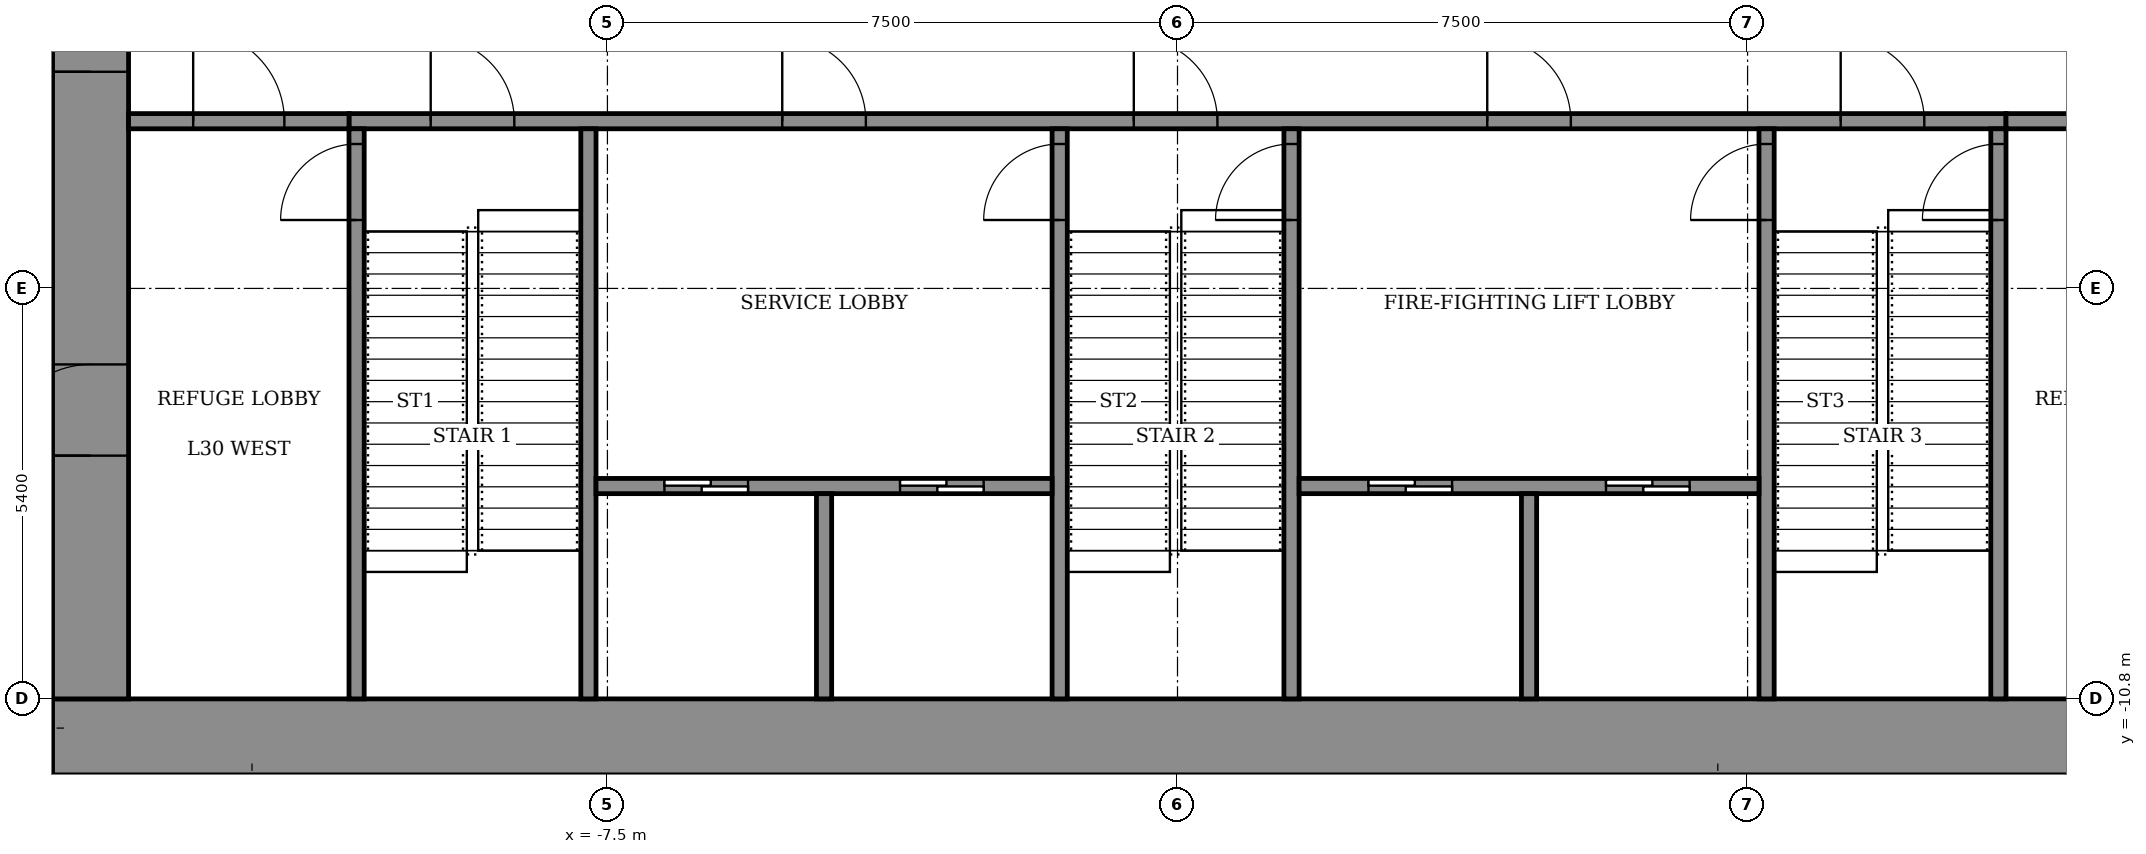
"""IFC4 building model, lengths in metres.
Left out: names, types, materials, properties, quantities, classifications, styles, units other than length and angle.
Written with IfcOpenShell. Run it as: python <this file> out.ifc"""

import sys

from ifc_helpers import new_model, si_unit, direction, frame, frame_2d, origin, place, context, subcontext, project, spatial, rectangle, extrude, element, fill, save


model = new_model("IFC4")
c1 = context("Model", 3, precision=1e-05, world=origin(), true_north=direction((0.0, 1.0)))
c2 = subcontext(c1, "Body", "Model", "MODEL_VIEW")
j1 = project(units=[si_unit("LENGTHUNIT", "METRE"), si_unit("PLANEANGLEUNIT", "RADIAN")], contexts=[c1])
p1 = place(None, origin())
s1 = spatial("IfcSite", under=j1, at=p1, CompositionType="ELEMENT")
p2 = place(p1, origin())
s2 = spatial("IfcBuilding", under=s1, at=p2, CompositionType="ELEMENT")
p3 = place(p2, frame((0.0, 0.0, 119.9)))
s3 = spatial("IfcBuildingStorey", under=s2, at=p3, CompositionType="ELEMENT", Elevation=119.9)
p4 = place(p3, frame((-14.8, -11.3, 0.0), z_axis=(0.0, 0.0, 1.0), x_axis=(1.0, 0.0, 0.0)))
e1 = element("IfcWall", 1, at=p4, inside=s3, PredefinedType="SHEAR", context=c2, shape_type="SweptSolid", body=[
    extrude(rectangle(XDim=29.6, YDim=1.0, at=frame_2d((14.8, 0.0))), origin(), (0.0, 0.0, 1.0), 5.6),
])
p5 = place(p3, frame((-14.3, -10.8, 0.0), z_axis=(0.0, 0.0, 1.0), x_axis=(0.0, 1.0, 0.0)))
e2 = element("IfcWall", 2, at=p5, inside=s3, PredefinedType="SHEAR", context=c2, shape_type="SweptSolid", body=[
    extrude(rectangle(XDim=21.6, YDim=1.0, at=frame_2d((10.8, 0.0))), origin(), (0.0, 0.0, 1.0), 5.6),
])
p6 = place(p5, frame((8.25, 0.0, 0.0)))
e3 = element("IfcOpeningElement", 3, at=p6, cuts=e2, PredefinedType="OPENING", context=c2, shape_type="SweptSolid", body=[
    extrude(rectangle(XDim=1.2, YDim=2.1, at=frame_2d((0.6, 1.05))), frame((0.0, 0.51, 0.0), z_axis=(0.0, -1.0, 0.0), x_axis=(1.0, 0.0, 0.0)), (0.0, 0.0, 1.0), 1.02),
])
p7 = place(p5, frame((15.25, 0.0, 0.0)))
e4 = element("IfcOpeningElement", 4, at=p7, cuts=e2, PredefinedType="OPENING", context=c2, shape_type="SweptSolid", body=[
    extrude(rectangle(XDim=1.2, YDim=2.1, at=frame_2d((0.6, 1.05))), frame((0.0, 0.51, 0.0), z_axis=(0.0, -1.0, 0.0), x_axis=(1.0, 0.0, 0.0)), (0.0, 0.0, 1.0), 1.02),
])
p8 = place(p5, frame((3.2, 0.0, 0.0)))
e5 = element("IfcOpeningElement", 5, at=p8, cuts=e2, PredefinedType="OPENING", context=c2, shape_type="SweptSolid", body=[
    extrude(rectangle(XDim=1.2, YDim=2.1, at=frame_2d((0.6, 1.05))), frame((0.0, 0.51, 0.0), z_axis=(0.0, -1.0, 0.0), x_axis=(1.0, 0.0, 0.0)), (0.0, 0.0, 1.0), 1.02),
])
p9 = place(p3, frame((-10.9, -3.2, 0.0), z_axis=(0.0, 0.0, 1.0), x_axis=(1.0, 0.0, 0.0)))
e6 = element("IfcWall", 6, at=p9, inside=s3, PredefinedType="SHEAR", context=c2, shape_type="SweptSolid", body=[
    extrude(rectangle(XDim=21.8, YDim=0.2, at=frame_2d((10.9, 0.0))), origin(), (0.0, 0.0, 1.0), 5.05),
])
p10 = place(p9, frame((1.075, 0.0, 0.0)))
e7 = element("IfcOpeningElement", 7, at=p10, cuts=e6, PredefinedType="OPENING", context=c2, shape_type="SweptSolid", body=[
    extrude(rectangle(XDim=1.1, YDim=2.1, at=frame_2d((0.55, 1.05))), frame((0.0, 0.11, 0.0), z_axis=(0.0, -1.0, 0.0), x_axis=(1.0, 0.0, 0.0)), (0.0, 0.0, 1.0), 0.22),
])
p11 = place(p9, frame((10.325, 0.0, 0.0)))
e8 = element("IfcOpeningElement", 8, at=p11, cuts=e6, PredefinedType="OPENING", context=c2, shape_type="SweptSolid", body=[
    extrude(rectangle(XDim=1.1, YDim=2.1, at=frame_2d((0.55, 1.05))), frame((0.0, 0.11, 0.0), z_axis=(0.0, -1.0, 0.0), x_axis=(1.0, 0.0, 0.0)), (0.0, 0.0, 1.0), 0.22),
])
p12 = place(p9, frame((19.625, 0.0, 0.0)))
e9 = element("IfcOpeningElement", 9, at=p12, cuts=e6, PredefinedType="OPENING", context=c2, shape_type="SweptSolid", body=[
    extrude(rectangle(XDim=1.1, YDim=2.1, at=frame_2d((0.55, 1.05))), frame((0.0, 0.11, 0.0), z_axis=(0.0, -1.0, 0.0), x_axis=(1.0, 0.0, 0.0)), (0.0, 0.0, 1.0), 0.22),
])
p13 = place(p9, frame((5.7, 0.0, 0.0)))
e10 = element("IfcOpeningElement", 10, at=p13, cuts=e6, PredefinedType="OPENING", context=c2, shape_type="SweptSolid", body=[
    extrude(rectangle(XDim=1.1, YDim=2.1, at=frame_2d((0.55, 1.05))), frame((0.0, 0.11, 0.0), z_axis=(0.0, -1.0, 0.0), x_axis=(1.0, 0.0, 0.0)), (0.0, 0.0, 1.0), 0.22),
])
p14 = place(p9, frame((14.975, 0.0, 0.0)))
e11 = element("IfcOpeningElement", 11, at=p14, cuts=e6, PredefinedType="OPENING", context=c2, shape_type="SweptSolid", body=[
    extrude(rectangle(XDim=1.1, YDim=2.1, at=frame_2d((0.55, 1.05))), frame((0.0, 0.11, 0.0), z_axis=(0.0, -1.0, 0.0), x_axis=(1.0, 0.0, 0.0)), (0.0, 0.0, 1.0), 0.22),
])
p15 = place(p3, frame((-10.8, -10.8, 0.0), z_axis=(0.0, 0.0, 1.0), x_axis=(0.0, 1.0, 0.0)))
e12 = element("IfcWall", 12, at=p15, inside=s3, PredefinedType="SHEAR", context=c2, shape_type="SweptSolid", body=[
    extrude(rectangle(XDim=7.5, YDim=0.2, at=frame_2d((3.75, 0.0))), origin(), (0.0, 0.0, 1.0), 5.05),
])
p16 = place(p15, frame((6.3, 0.0, 0.0)))
e13 = element("IfcOpeningElement", 13, at=p16, cuts=e12, PredefinedType="OPENING", context=c2, shape_type="SweptSolid", body=[
    extrude(rectangle(XDim=1.0, YDim=2.1, at=frame_2d((0.5, 1.05))), frame((0.0, 0.11, 0.0), z_axis=(0.0, -1.0, 0.0), x_axis=(1.0, 0.0, 0.0)), (0.0, 0.0, 1.0), 0.22),
])
p17 = place(p3, frame((-7.75, -10.8, 0.0), z_axis=(0.0, 0.0, 1.0), x_axis=(0.0, 1.0, 0.0)))
e14 = element("IfcWall", 14, at=p17, inside=s3, PredefinedType="SHEAR", context=c2, shape_type="SweptSolid", body=[
    extrude(rectangle(XDim=7.5, YDim=0.2, at=frame_2d((3.75, 0.0))), origin(), (0.0, 0.0, 1.0), 5.05),
])
p18 = place(p3, frame((-1.55, -10.8, 0.0), z_axis=(0.0, 0.0, 1.0), x_axis=(0.0, 1.0, 0.0)))
e15 = element("IfcWall", 15, at=p18, inside=s3, PredefinedType="SHEAR", context=c2, shape_type="SweptSolid", body=[
    extrude(rectangle(XDim=7.5, YDim=0.2, at=frame_2d((3.75, 0.0))), origin(), (0.0, 0.0, 1.0), 5.05),
])
p19 = place(p18, frame((6.3, 0.0, 0.0)))
e16 = element("IfcOpeningElement", 16, at=p19, cuts=e15, PredefinedType="OPENING", context=c2, shape_type="SweptSolid", body=[
    extrude(rectangle(XDim=1.0, YDim=2.1, at=frame_2d((0.5, 1.05))), frame((0.0, 0.11, 0.0), z_axis=(0.0, -1.0, 0.0), x_axis=(1.0, 0.0, 0.0)), (0.0, 0.0, 1.0), 0.22),
])
p20 = place(p3, frame((1.5, -10.8, 0.0), z_axis=(0.0, 0.0, 1.0), x_axis=(0.0, 1.0, 0.0)))
e17 = element("IfcWall", 17, at=p20, inside=s3, PredefinedType="SHEAR", context=c2, shape_type="SweptSolid", body=[
    extrude(rectangle(XDim=7.5, YDim=0.2, at=frame_2d((3.75, 0.0))), origin(), (0.0, 0.0, 1.0), 5.05),
])
p21 = place(p20, frame((6.3, 0.0, 0.0)))
e18 = element("IfcOpeningElement", 18, at=p21, cuts=e17, PredefinedType="OPENING", context=c2, shape_type="SweptSolid", body=[
    extrude(rectangle(XDim=1.0, YDim=2.1, at=frame_2d((0.5, 1.05))), frame((0.0, 0.11, 0.0), z_axis=(0.0, -1.0, 0.0), x_axis=(1.0, 0.0, 0.0)), (0.0, 0.0, 1.0), 0.22),
])
p22 = place(p3, frame((7.75, -10.8, 0.0), z_axis=(0.0, 0.0, 1.0), x_axis=(0.0, 1.0, 0.0)))
e19 = element("IfcWall", 19, at=p22, inside=s3, PredefinedType="SHEAR", context=c2, shape_type="SweptSolid", body=[
    extrude(rectangle(XDim=7.5, YDim=0.2, at=frame_2d((3.75, 0.0))), origin(), (0.0, 0.0, 1.0), 5.05),
])
p23 = place(p22, frame((6.3, 0.0, 0.0)))
e20 = element("IfcOpeningElement", 20, at=p23, cuts=e19, PredefinedType="OPENING", context=c2, shape_type="SweptSolid", body=[
    extrude(rectangle(XDim=1.0, YDim=2.1, at=frame_2d((0.5, 1.05))), frame((0.0, 0.11, 0.0), z_axis=(0.0, -1.0, 0.0), x_axis=(1.0, 0.0, 0.0)), (0.0, 0.0, 1.0), 0.22),
])
p24 = place(p3, frame((10.8, -10.8, 0.0), z_axis=(0.0, 0.0, 1.0), x_axis=(0.0, 1.0, 0.0)))
e21 = element("IfcWall", 21, at=p24, inside=s3, PredefinedType="SHEAR", context=c2, shape_type="SweptSolid", body=[
    extrude(rectangle(XDim=7.5, YDim=0.2, at=frame_2d((3.75, 0.0))), origin(), (0.0, 0.0, 1.0), 5.05),
])
p25 = place(p24, frame((6.3, 0.0, 0.0)))
e22 = element("IfcOpeningElement", 22, at=p25, cuts=e21, PredefinedType="OPENING", context=c2, shape_type="SweptSolid", body=[
    extrude(rectangle(XDim=1.0, YDim=2.1, at=frame_2d((0.5, 1.05))), frame((0.0, 0.11, 0.0), z_axis=(0.0, -1.0, 0.0), x_axis=(1.0, 0.0, 0.0)), (0.0, 0.0, 1.0), 0.22),
])
p26 = place(p3, frame((-7.65, -8.0, 0.0), z_axis=(0.0, 0.0, 1.0), x_axis=(1.0, 0.0, 0.0)))
e23 = element("IfcWall", 23, at=p26, inside=s3, PredefinedType="SHEAR", context=c2, shape_type="SweptSolid", body=[
    extrude(rectangle(XDim=6.0, YDim=0.2, at=frame_2d((3.0, 0.0))), origin(), (0.0, 0.0, 1.0), 5.05),
])
p27 = place(p26, frame((0.9, 0.0, 0.0)))
e24 = element("IfcOpeningElement", 24, at=p27, cuts=e23, PredefinedType="OPENING", context=c2, shape_type="SweptSolid", body=[
    extrude(rectangle(XDim=1.1, YDim=2.1, at=frame_2d((0.55, 1.05))), frame((0.0, 0.11, 0.0), z_axis=(0.0, -1.0, 0.0), x_axis=(1.0, 0.0, 0.0)), (0.0, 0.0, 1.0), 0.22),
])
p28 = place(p26, frame((4.0, 0.0, 0.0)))
e25 = element("IfcOpeningElement", 25, at=p28, cuts=e23, PredefinedType="OPENING", context=c2, shape_type="SweptSolid", body=[
    extrude(rectangle(XDim=1.1, YDim=2.1, at=frame_2d((0.55, 1.05))), frame((0.0, 0.11, 0.0), z_axis=(0.0, -1.0, 0.0), x_axis=(1.0, 0.0, 0.0)), (0.0, 0.0, 1.0), 0.22),
])
p29 = place(p3, frame((-4.65, -10.8, 0.0), z_axis=(0.0, 0.0, 1.0), x_axis=(0.0, 1.0, 0.0)))
e26 = element("IfcWall", 26, at=p29, inside=s3, PredefinedType="SHEAR", context=c2, shape_type="SweptSolid", body=[
    extrude(rectangle(XDim=2.7, YDim=0.2, at=frame_2d((1.35, 0.0))), origin(), (0.0, 0.0, 1.0), 5.05),
])
p30 = place(p3, frame((1.6, -8.0, 0.0), z_axis=(0.0, 0.0, 1.0), x_axis=(1.0, 0.0, 0.0)))
e27 = element("IfcWall", 27, at=p30, inside=s3, PredefinedType="SHEAR", context=c2, shape_type="SweptSolid", body=[
    extrude(rectangle(XDim=6.05, YDim=0.2, at=frame_2d((3.025, 0.0))), origin(), (0.0, 0.0, 1.0), 5.05),
])
p31 = place(p30, frame((0.913, 0.0, 0.0)))
e28 = element("IfcOpeningElement", 28, at=p31, cuts=e27, PredefinedType="OPENING", context=c2, shape_type="SweptSolid", body=[
    extrude(rectangle(XDim=1.1, YDim=2.1, at=frame_2d((0.55, 1.05))), frame((0.0, 0.11, 0.0), z_axis=(0.0, -1.0, 0.0), x_axis=(1.0, 0.0, 0.0)), (0.0, 0.0, 1.0), 0.22),
])
p32 = place(p30, frame((4.038, 0.0, 0.0)))
e29 = element("IfcOpeningElement", 29, at=p32, cuts=e27, PredefinedType="OPENING", context=c2, shape_type="SweptSolid", body=[
    extrude(rectangle(XDim=1.1, YDim=2.1, at=frame_2d((0.55, 1.05))), frame((0.0, 0.11, 0.0), z_axis=(0.0, -1.0, 0.0), x_axis=(1.0, 0.0, 0.0)), (0.0, 0.0, 1.0), 0.22),
])
p33 = place(p3, frame((4.625, -10.8, 0.0), z_axis=(0.0, 0.0, 1.0), x_axis=(0.0, 1.0, 0.0)))
e30 = element("IfcWall", 30, at=p33, inside=s3, PredefinedType="SHEAR", context=c2, shape_type="SweptSolid", body=[
    extrude(rectangle(XDim=2.7, YDim=0.2, at=frame_2d((1.35, 0.0))), origin(), (0.0, 0.0, 1.0), 5.05),
])
p34 = place(p3, frame((-13.8, -3.2, 0.0), z_axis=(0.0, 0.0, 1.0), x_axis=(1.0, 0.0, 0.0)))
e31 = element("IfcWall", 31, at=p34, inside=s3, PredefinedType="STANDARD", context=c2, shape_type="SweptSolid", body=[
    extrude(rectangle(XDim=2.9, YDim=0.2, at=frame_2d((1.45, 0.0))), origin(), (0.0, 0.0, 1.0), 5.05),
])
p35 = place(p34, frame((0.85, 0.0, 0.0)))
e32 = element("IfcOpeningElement", 32, at=p35, cuts=e31, PredefinedType="OPENING", context=c2, shape_type="SweptSolid", body=[
    extrude(rectangle(XDim=1.2, YDim=2.1, at=frame_2d((0.6, 1.05))), frame((0.0, 0.11, 0.0), z_axis=(0.0, -1.0, 0.0), x_axis=(1.0, 0.0, 0.0)), (0.0, 0.0, 1.0), 0.22),
])
p36 = place(p3, frame((10.9, -3.2, 0.0), z_axis=(0.0, 0.0, 1.0), x_axis=(1.0, 0.0, 0.0)))
e33 = element("IfcWall", 33, at=p36, inside=s3, PredefinedType="STANDARD", context=c2, shape_type="SweptSolid", body=[
    extrude(rectangle(XDim=2.9, YDim=0.2, at=frame_2d((1.45, 0.0))), origin(), (0.0, 0.0, 1.0), 5.05),
])
p37 = place(p36, frame((0.85, 0.0, 0.0)))
e34 = element("IfcOpeningElement", 34, at=p37, cuts=e33, PredefinedType="OPENING", context=c2, shape_type="SweptSolid", body=[
    extrude(rectangle(XDim=1.2, YDim=2.1, at=frame_2d((0.6, 1.05))), frame((0.0, 0.11, 0.0), z_axis=(0.0, -1.0, 0.0), x_axis=(1.0, 0.0, 0.0)), (0.0, 0.0, 1.0), 0.22),
])
p38 = place(p6, origin())
e35 = element("IfcDoor", 35, at=p38, inside=s3, OperationType="DOUBLE_DOOR_SINGLE_SWING", PredefinedType="DOOR", context=c2, shape_type="SweptSolid", body=[
    extrude(rectangle(XDim=1.2, YDim=2.1, at=frame_2d((0.6, 1.05))), frame((0.0, 0.025, 0.0), z_axis=(0.0, -1.0, 0.0), x_axis=(1.0, 0.0, 0.0)), (0.0, 0.0, 1.0), 0.05),
])
fill(e3, e35)
p39 = place(p8, origin())
e36 = element("IfcDoor", 36, at=p39, inside=s3, OperationType="DOUBLE_DOOR_SINGLE_SWING", PredefinedType="DOOR", context=c2, shape_type="SweptSolid", body=[
    extrude(rectangle(XDim=1.2, YDim=2.1, at=frame_2d((0.6, 1.05))), frame((0.0, 0.025, 0.0), z_axis=(0.0, -1.0, 0.0), x_axis=(1.0, 0.0, 0.0)), (0.0, 0.0, 1.0), 0.05),
])
fill(e5, e36)
p40 = place(p31, origin())
e37 = element("IfcDoor", 37, at=p40, inside=s3, OperationType="SLIDING_TO_LEFT", PredefinedType="DOOR", context=c2, shape_type="SweptSolid", body=[
    extrude(rectangle(XDim=1.1, YDim=2.1, at=frame_2d((0.55, 1.05))), frame((0.0, 0.025, 0.0), z_axis=(0.0, -1.0, 0.0), x_axis=(1.0, 0.0, 0.0)), (0.0, 0.0, 1.0), 0.05),
])
fill(e28, e37)
p41 = place(p27, origin())
e38 = element("IfcDoor", 38, at=p41, inside=s3, OperationType="SLIDING_TO_LEFT", PredefinedType="DOOR", context=c2, shape_type="SweptSolid", body=[
    extrude(rectangle(XDim=1.1, YDim=2.1, at=frame_2d((0.55, 1.05))), frame((0.0, 0.025, 0.0), z_axis=(0.0, -1.0, 0.0), x_axis=(1.0, 0.0, 0.0)), (0.0, 0.0, 1.0), 0.05),
])
fill(e24, e38)
p42 = place(p32, origin())
e39 = element("IfcDoor", 39, at=p42, inside=s3, OperationType="SLIDING_TO_LEFT", PredefinedType="DOOR", context=c2, shape_type="SweptSolid", body=[
    extrude(rectangle(XDim=1.1, YDim=2.1, at=frame_2d((0.55, 1.05))), frame((0.0, 0.025, 0.0), z_axis=(0.0, -1.0, 0.0), x_axis=(1.0, 0.0, 0.0)), (0.0, 0.0, 1.0), 0.05),
])
fill(e29, e39)
p43 = place(p28, origin())
e40 = element("IfcDoor", 40, at=p43, inside=s3, OperationType="SLIDING_TO_LEFT", PredefinedType="DOOR", context=c2, shape_type="SweptSolid", body=[
    extrude(rectangle(XDim=1.1, YDim=2.1, at=frame_2d((0.55, 1.05))), frame((0.0, 0.025, 0.0), z_axis=(0.0, -1.0, 0.0), x_axis=(1.0, 0.0, 0.0)), (0.0, 0.0, 1.0), 0.05),
])
fill(e25, e40)
p44 = place(p10, origin())
e41 = element("IfcDoor", 41, at=p44, inside=s3, OperationType="SINGLE_SWING_RIGHT", PredefinedType="DOOR", context=c2, shape_type="SweptSolid", body=[
    extrude(rectangle(XDim=1.1, YDim=2.1, at=frame_2d((0.55, 1.05))), frame((0.0, 0.025, 0.0), z_axis=(0.0, -1.0, 0.0), x_axis=(1.0, 0.0, 0.0)), (0.0, 0.0, 1.0), 0.05),
])
fill(e7, e41)
p45 = place(p11, origin())
e42 = element("IfcDoor", 42, at=p45, inside=s3, OperationType="SINGLE_SWING_RIGHT", PredefinedType="DOOR", context=c2, shape_type="SweptSolid", body=[
    extrude(rectangle(XDim=1.1, YDim=2.1, at=frame_2d((0.55, 1.05))), frame((0.0, 0.025, 0.0), z_axis=(0.0, -1.0, 0.0), x_axis=(1.0, 0.0, 0.0)), (0.0, 0.0, 1.0), 0.05),
])
fill(e8, e42)
p46 = place(p12, origin())
e43 = element("IfcDoor", 43, at=p46, inside=s3, OperationType="SINGLE_SWING_RIGHT", PredefinedType="DOOR", context=c2, shape_type="SweptSolid", body=[
    extrude(rectangle(XDim=1.1, YDim=2.1, at=frame_2d((0.55, 1.05))), frame((0.0, 0.025, 0.0), z_axis=(0.0, -1.0, 0.0), x_axis=(1.0, 0.0, 0.0)), (0.0, 0.0, 1.0), 0.05),
])
fill(e9, e43)
p47 = place(p13, origin())
e44 = element("IfcDoor", 44, at=p47, inside=s3, OperationType="SINGLE_SWING_LEFT", PredefinedType="DOOR", context=c2, shape_type="SweptSolid", body=[
    extrude(rectangle(XDim=1.1, YDim=2.1, at=frame_2d((0.55, 1.05))), frame((0.0, 0.025, 0.0), z_axis=(0.0, -1.0, 0.0), x_axis=(1.0, 0.0, 0.0)), (0.0, 0.0, 1.0), 0.05),
])
fill(e10, e44)
p48 = place(p14, origin())
e45 = element("IfcDoor", 45, at=p48, inside=s3, OperationType="SINGLE_SWING_LEFT", PredefinedType="DOOR", context=c2, shape_type="SweptSolid", body=[
    extrude(rectangle(XDim=1.1, YDim=2.1, at=frame_2d((0.55, 1.05))), frame((0.0, 0.025, 0.0), z_axis=(0.0, -1.0, 0.0), x_axis=(1.0, 0.0, 0.0)), (0.0, 0.0, 1.0), 0.05),
])
fill(e11, e45)
p49 = place(p19, origin())
e46 = element("IfcDoor", 46, at=p49, inside=s3, OperationType="SINGLE_SWING_RIGHT", PredefinedType="DOOR", context=c2, shape_type="SweptSolid", body=[
    extrude(rectangle(XDim=1.0, YDim=2.1, at=frame_2d((0.5, 1.05))), frame((0.0, 0.025, 0.0), z_axis=(0.0, -1.0, 0.0), x_axis=(1.0, 0.0, 0.0)), (0.0, 0.0, 1.0), 0.05),
])
fill(e16, e46)
p50 = place(p21, origin())
e47 = element("IfcDoor", 47, at=p50, inside=s3, OperationType="SINGLE_SWING_RIGHT", PredefinedType="DOOR", context=c2, shape_type="SweptSolid", body=[
    extrude(rectangle(XDim=1.0, YDim=2.1, at=frame_2d((0.5, 1.05))), frame((0.0, 0.025, 0.0), z_axis=(0.0, -1.0, 0.0), x_axis=(1.0, 0.0, 0.0)), (0.0, 0.0, 1.0), 0.05),
])
fill(e18, e47)
p51 = place(p23, origin())
e48 = element("IfcDoor", 48, at=p51, inside=s3, OperationType="SINGLE_SWING_RIGHT", PredefinedType="DOOR", context=c2, shape_type="SweptSolid", body=[
    extrude(rectangle(XDim=1.0, YDim=2.1, at=frame_2d((0.5, 1.05))), frame((0.0, 0.025, 0.0), z_axis=(0.0, -1.0, 0.0), x_axis=(1.0, 0.0, 0.0)), (0.0, 0.0, 1.0), 0.05),
])
fill(e20, e48)
p52 = place(p35, origin())
e49 = element("IfcDoor", 49, at=p52, inside=s3, OperationType="SINGLE_SWING_LEFT", PredefinedType="DOOR", context=c2, shape_type="SweptSolid", body=[
    extrude(rectangle(XDim=1.2, YDim=2.1, at=frame_2d((0.6, 1.05))), frame((0.0, 0.025, 0.0), z_axis=(0.0, -1.0, 0.0), x_axis=(1.0, 0.0, 0.0)), (0.0, 0.0, 1.0), 0.05),
])
fill(e32, e49)
p53 = place(p16, origin())
e50 = element("IfcDoor", 50, at=p53, inside=s3, OperationType="SINGLE_SWING_RIGHT", PredefinedType="DOOR", context=c2, shape_type="SweptSolid", body=[
    extrude(rectangle(XDim=1.0, YDim=2.1, at=frame_2d((0.5, 1.05))), frame((0.0, 0.025, 0.0), z_axis=(0.0, -1.0, 0.0), x_axis=(1.0, 0.0, 0.0)), (0.0, 0.0, 1.0), 0.05),
])
fill(e13, e50)
p54 = place(p25, origin())
e51 = element("IfcDoor", 51, at=p54, inside=s3, OperationType="SINGLE_SWING_RIGHT", PredefinedType="DOOR", context=c2, shape_type="SweptSolid", body=[
    extrude(rectangle(XDim=1.0, YDim=2.1, at=frame_2d((0.5, 1.05))), frame((0.0, 0.025, 0.0), z_axis=(0.0, -1.0, 0.0), x_axis=(1.0, 0.0, 0.0)), (0.0, 0.0, 1.0), 0.05),
])
fill(e22, e51)
save(model, sys.argv[1])
